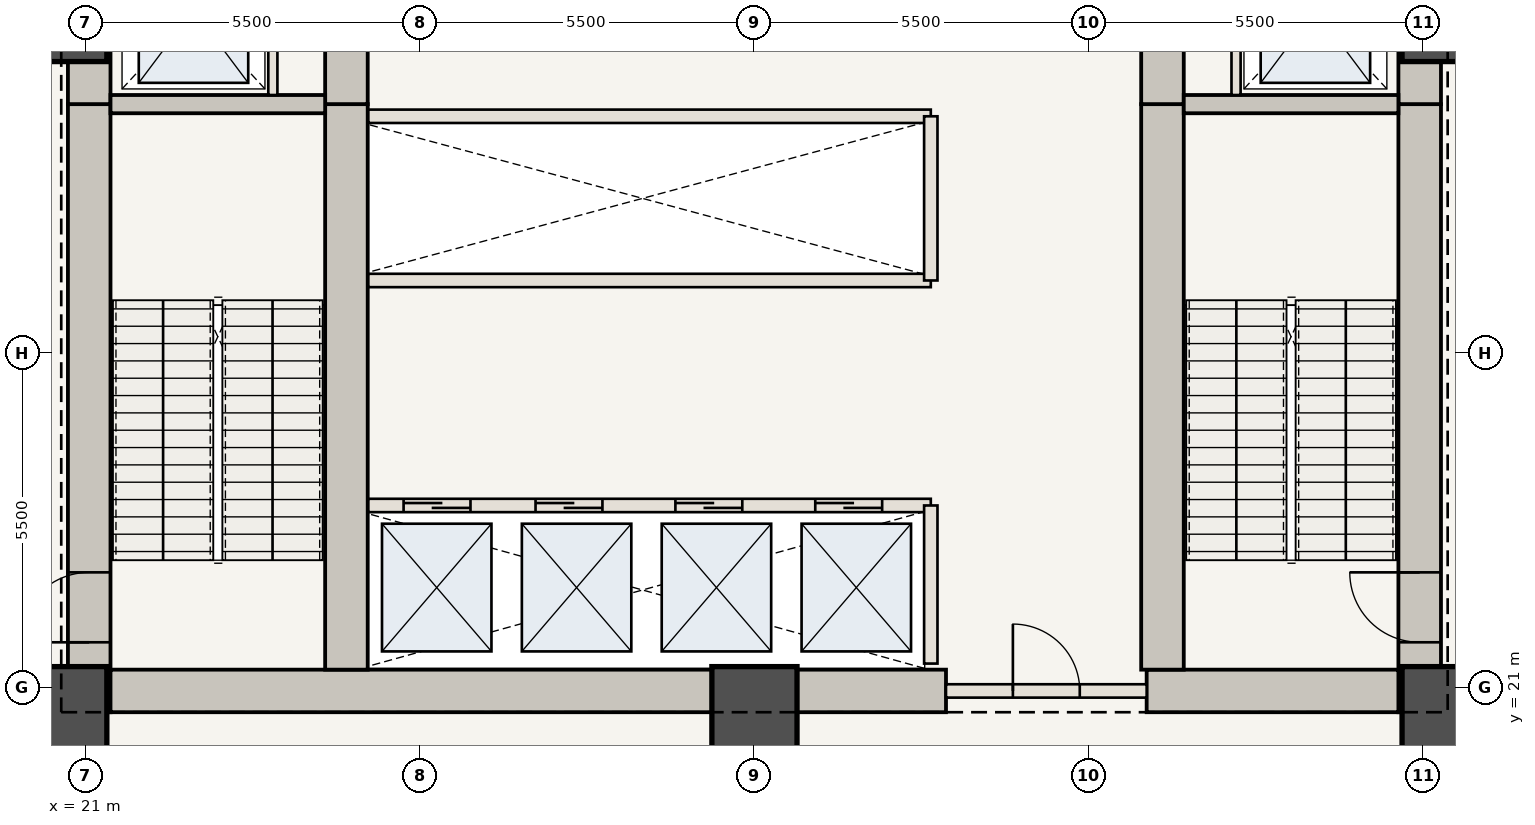
"""IFC4 building model, lengths in metres.
Left out: names, types, materials, properties, quantities, classifications, styles, units other than length and angle.
Written with IfcOpenShell. Run it as: python <this file> out.ifc"""

import sys

from ifc_helpers import new_model, si_unit, direction, frame, frame_2d, origin, origin_2d, place, context, subcontext, project, spatial, rectangle, extrude, element, fill, save


model = new_model("IFC4")
c1 = context("Model", 3, precision=1e-05, world=origin(), true_north=direction((0.0, 1.0)))
c2 = subcontext(c1, "Body", "Model", "MODEL_VIEW")
j1 = project(units=[si_unit("LENGTHUNIT", "METRE"), si_unit("PLANEANGLEUNIT", "RADIAN")], contexts=[c1])
p1 = place(None, origin())
s1 = spatial("IfcSite", under=j1, at=p1, CompositionType="ELEMENT")
p2 = place(p1, origin())
s2 = spatial("IfcBuilding", under=s1, at=p2, CompositionType="ELEMENT")
p3 = place(p2, frame((0.0, 0.0, 23.8)))
s3 = spatial("IfcBuildingStorey", under=s2, at=p3, CompositionType="ELEMENT", Elevation=23.8)
p4 = place(p3, frame((21.06, 20.6, 0.0), z_axis=(0.0, 0.0, 1.0), x_axis=(0.0, 1.0, 0.0)))
e1 = element("IfcWall", 1, at=p4, inside=s3, PredefinedType="SHEAR", context=c2, shape_type="SweptSolid", body=[
    extrude(rectangle(XDim=10.0, YDim=0.7, at=frame_2d((5.0, 0.0))), origin(), (0.0, 0.0, 1.0), 5.6),
])
p5 = place(p4, frame((1.15, 0.0, 0.0)))
e2 = element("IfcOpeningElement", 2, at=p5, cuts=e1, PredefinedType="OPENING", context=c2, shape_type="SweptSolid", body=[
    extrude(rectangle(XDim=1.15, YDim=2.15, at=frame_2d((0.575, 1.075))), frame((0.0, 0.36, 0.0), z_axis=(0.0, -1.0, 0.0), x_axis=(1.0, 0.0, 0.0)), (0.0, 0.0, 1.0), 0.72),
])
p6 = place(p3, frame((21.06, 30.6, 0.0), z_axis=(0.0, 0.0, 1.0), x_axis=(0.0, 1.0, 0.0)))
e3 = element("IfcWall", 3, at=p6, inside=s3, PredefinedType="SHEAR", context=c2, shape_type="SweptSolid", body=[
    extrude(rectangle(XDim=12.75, YDim=0.7, at=frame_2d((6.375, 0.0))), origin(), (0.0, 0.0, 1.0), 5.6),
])
p7 = place(p6, frame((4.2, 0.0, 0.0)))
e4 = element("IfcOpeningElement", 4, at=p7, cuts=e3, PredefinedType="OPENING", context=c2, shape_type="SweptSolid", body=[
    extrude(rectangle(XDim=1.1, YDim=2.15, at=frame_2d((0.55, 1.075))), frame((0.0, 0.36, 0.0), z_axis=(0.0, -1.0, 0.0), x_axis=(1.0, 0.0, 0.0)), (0.0, 0.0, 1.0), 0.72),
])
p8 = place(p6, frame((9.2, 0.0, 0.0)))
e5 = element("IfcOpeningElement", 5, at=p8, cuts=e3, PredefinedType="OPENING", context=c2, shape_type="SweptSolid", body=[
    extrude(rectangle(XDim=0.92, YDim=2.1, at=frame_2d((0.46, 1.05))), frame((0.0, 0.36, 0.0), z_axis=(0.0, -1.0, 0.0), x_axis=(1.0, 0.0, 0.0)), (0.0, 0.0, 1.0), 0.72),
])
p9 = place(p3, frame((42.94, 20.6, 0.0), z_axis=(0.0, 0.0, 1.0), x_axis=(0.0, 1.0, 0.0)))
e6 = element("IfcWall", 6, at=p9, inside=s3, PredefinedType="SHEAR", context=c2, shape_type="SweptSolid", body=[
    extrude(rectangle(XDim=10.0, YDim=0.7, at=frame_2d((5.0, 0.0))), origin(), (0.0, 0.0, 1.0), 5.6),
])
p10 = place(p9, frame((1.15, 0.0, 0.0)))
e7 = element("IfcOpeningElement", 7, at=p10, cuts=e6, PredefinedType="OPENING", context=c2, shape_type="SweptSolid", body=[
    extrude(rectangle(XDim=1.15, YDim=2.15, at=frame_2d((0.575, 1.075))), frame((0.0, 0.36, 0.0), z_axis=(0.0, -1.0, 0.0), x_axis=(1.0, 0.0, 0.0)), (0.0, 0.0, 1.0), 0.72),
])
p11 = place(p3, frame((42.94, 30.6, 0.0), z_axis=(0.0, 0.0, 1.0), x_axis=(0.0, 1.0, 0.0)))
e8 = element("IfcWall", 8, at=p11, inside=s3, PredefinedType="SHEAR", context=c2, shape_type="SweptSolid", body=[
    extrude(rectangle(XDim=12.75, YDim=0.7, at=frame_2d((6.375, 0.0))), origin(), (0.0, 0.0, 1.0), 5.6),
])
p12 = place(p11, frame((4.2, 0.0, 0.0)))
e9 = element("IfcOpeningElement", 9, at=p12, cuts=e8, PredefinedType="OPENING", context=c2, shape_type="SweptSolid", body=[
    extrude(rectangle(XDim=1.1, YDim=2.15, at=frame_2d((0.55, 1.075))), frame((0.0, 0.36, 0.0), z_axis=(0.0, -1.0, 0.0), x_axis=(1.0, 0.0, 0.0)), (0.0, 0.0, 1.0), 0.72),
])
p13 = place(p11, frame((8.05, 0.0, 0.0)))
e10 = element("IfcOpeningElement", 10, at=p13, cuts=e8, PredefinedType="OPENING", context=c2, shape_type="SweptSolid", body=[
    extrude(rectangle(XDim=0.88, YDim=2.1, at=frame_2d((0.44, 1.05))), frame((0.0, 0.36, 0.0), z_axis=(0.0, -1.0, 0.0), x_axis=(1.0, 0.0, 0.0)), (0.0, 0.0, 1.0), 0.72),
])
p14 = place(p11, frame((9.45, 0.0, 0.0)))
e11 = element("IfcOpeningElement", 11, at=p14, cuts=e8, PredefinedType="OPENING", context=c2, shape_type="SweptSolid", body=[
    extrude(rectangle(XDim=0.88, YDim=2.1, at=frame_2d((0.44, 1.05))), frame((0.0, 0.36, 0.0), z_axis=(0.0, -1.0, 0.0), x_axis=(1.0, 0.0, 0.0)), (0.0, 0.0, 1.0), 0.72),
])
p15 = place(p11, frame((10.85, 0.0, 0.0)))
e12 = element("IfcOpeningElement", 12, at=p15, cuts=e8, PredefinedType="OPENING", context=c2, shape_type="SweptSolid", body=[
    extrude(rectangle(XDim=0.88, YDim=2.1, at=frame_2d((0.44, 1.05))), frame((0.0, 0.36, 0.0), z_axis=(0.0, -1.0, 0.0), x_axis=(1.0, 0.0, 0.0)), (0.0, 0.0, 1.0), 0.72),
])
p16 = place(p3, frame((21.41, 20.95, 0.0), z_axis=(0.0, 0.0, 1.0), x_axis=(1.0, 0.0, 0.0)))
e13 = element("IfcWall", 13, at=p16, inside=s3, PredefinedType="SHEAR", context=c2, shape_type="SweptSolid", body=[
    extrude(rectangle(XDim=13.74, YDim=0.7, at=frame_2d((6.87, 0.0))), origin(), (0.0, 0.0, 1.0), 5.6),
])
p17 = place(p3, frame((38.45, 20.95, 0.0), z_axis=(0.0, 0.0, 1.0), x_axis=(1.0, 0.0, 0.0)))
e14 = element("IfcWall", 14, at=p17, inside=s3, PredefinedType="SHEAR", context=c2, shape_type="SweptSolid", body=[
    extrude(rectangle(XDim=4.14, YDim=0.7, at=frame_2d((2.07, 0.0))), origin(), (0.0, 0.0, 1.0), 5.6),
])
p18 = place(p3, frame((25.29, 21.3, 0.0), z_axis=(0.0, 0.0, 1.0), x_axis=(0.0, 1.0, 0.0)))
e15 = element("IfcWall", 15, at=p18, inside=s3, PredefinedType="SHEAR", context=c2, shape_type="SweptSolid", body=[
    extrude(rectangle(XDim=9.3, YDim=0.7, at=frame_2d((4.65, 0.0))), origin(), (0.0, 0.0, 1.0), 5.6),
])
p19 = place(p3, frame((25.29, 30.6, 0.0), z_axis=(0.0, 0.0, 1.0), x_axis=(0.0, 1.0, 0.0)))
e16 = element("IfcWall", 16, at=p19, inside=s3, PredefinedType="SHEAR", context=c2, shape_type="SweptSolid", body=[
    extrude(rectangle(XDim=12.05, YDim=0.7, at=frame_2d((6.025, 0.0))), origin(), (0.0, 0.0, 1.0), 5.6),
])
p20 = place(p19, frame((6.25, 0.0, 0.0)))
e17 = element("IfcOpeningElement", 17, at=p20, cuts=e16, PredefinedType="OPENING", context=c2, shape_type="SweptSolid", body=[
    extrude(rectangle(XDim=1.1, YDim=2.15, at=frame_2d((0.55, 1.075))), frame((0.0, 0.36, 0.0), z_axis=(0.0, -1.0, 0.0), x_axis=(1.0, 0.0, 0.0)), (0.0, 0.0, 1.0), 0.72),
])
p21 = place(p3, frame((38.71, 21.3, 0.0), z_axis=(0.0, 0.0, 1.0), x_axis=(0.0, 1.0, 0.0)))
e18 = element("IfcWall", 18, at=p21, inside=s3, PredefinedType="SHEAR", context=c2, shape_type="SweptSolid", body=[
    extrude(rectangle(XDim=9.3, YDim=0.7, at=frame_2d((4.65, 0.0))), origin(), (0.0, 0.0, 1.0), 5.6),
])
p22 = place(p3, frame((38.71, 30.6, 0.0), z_axis=(0.0, 0.0, 1.0), x_axis=(0.0, 1.0, 0.0)))
e19 = element("IfcWall", 19, at=p22, inside=s3, PredefinedType="SHEAR", context=c2, shape_type="SweptSolid", body=[
    extrude(rectangle(XDim=12.05, YDim=0.7, at=frame_2d((6.025, 0.0))), origin(), (0.0, 0.0, 1.0), 5.6),
])
for number, where, z_axis, x_axis in (
    (20, (20.65, 20.65, 0.0), (0.0, 0.0, 1.0), (1.0, 0.0, 0.0)),
    (21, (32.0, 20.65, 0.0), (0.0, 0.0, 1.0), (1.0, 0.0, 0.0)),
    (22, (43.35, 20.65, 0.0), (0.0, 0.0, 1.0), (1.0, 0.0, 0.0)),
    (23, (43.35, 32.0, 0.0), (0.0, 0.0, 1.0), (1.0, 0.0, 0.0)),
    (24, (20.65, 32.0, 0.0), (0.0, 0.0, 1.0), (1.0, 0.0, 0.0)),
):
    element("IfcColumn", number, at=place(p3, frame(where, z_axis=z_axis, x_axis=x_axis)), inside=s3, PredefinedType="COLUMN", context=c2, shape_type="SweptSolid", body=[
        extrude(rectangle(XDim=1.4, YDim=1.4, at=origin_2d()), origin(), (0.0, 0.0, 1.0), 5.6),
    ])
for number, where, z_axis, x_axis in (
    (25, (21.41, 30.6, 0.0), (0.0, 0.0, 1.0), (1.0, 0.0, 0.0)),
    (26, (39.06, 30.6, 0.0), (0.0, 0.0, 1.0), (1.0, 0.0, 0.0)),
):
    element("IfcWall", number, at=place(p3, frame(where, z_axis=z_axis, x_axis=x_axis)), inside=s3, PredefinedType="SHEAR", context=c2, shape_type="SweptSolid", body=[
        extrude(rectangle(XDim=3.53, YDim=0.3, at=frame_2d((1.765, 0.0))), origin(), (0.0, 0.0, 1.0), 5.18),
    ])
for number, where, z_axis, x_axis in (
    (27, (24.08, 30.75, 0.0), (0.0, 0.0, 1.0), (0.0, 1.0, 0.0)),
    (28, (39.92, 30.75, 0.0), (0.0, 0.0, 1.0), (0.0, 1.0, 0.0)),
):
    element("IfcWall", number, at=place(p3, frame(where, z_axis=z_axis, x_axis=x_axis)), inside=s3, PredefinedType="STANDARD", context=c2, shape_type="SweptSolid", body=[
        extrude(rectangle(XDim=2.65, YDim=0.15, at=frame_2d((1.325, 0.0))), origin(), (0.0, 0.0, 1.0), 5.18),
    ])
p23 = place(p3, frame((35.15, 20.95, 0.0), z_axis=(0.0, 0.0, 1.0), x_axis=(1.0, 0.0, 0.0)))
e29 = element("IfcWall", 29, at=p23, inside=s3, PredefinedType="STANDARD", context=c2, shape_type="SweptSolid", body=[
    extrude(rectangle(XDim=3.3, YDim=0.22, at=frame_2d((1.65, 0.0))), origin(), (0.0, 0.0, 1.0), 5.18),
])
p24 = place(p23, frame((1.1, 0.0, 0.0)))
e30 = element("IfcOpeningElement", 30, at=p24, cuts=e29, PredefinedType="OPENING", context=c2, shape_type="SweptSolid", body=[
    extrude(rectangle(XDim=1.1, YDim=2.15, at=frame_2d((0.55, 1.075))), frame((0.0, 0.12, 0.0), z_axis=(0.0, -1.0, 0.0), x_axis=(1.0, 0.0, 0.0)), (0.0, 0.0, 1.0), 0.24),
])
p25 = place(p3, frame((25.65, 24.0, 0.0), z_axis=(0.0, 0.0, 1.0), x_axis=(1.0, 0.0, 0.0)))
e31 = element("IfcWall", 31, at=p25, inside=s3, PredefinedType="STANDARD", context=c2, shape_type="SweptSolid", body=[
    extrude(rectangle(XDim=9.25, YDim=0.22, at=frame_2d((4.625, 0.0))), origin(), (0.0, 0.0, 1.0), 5.18),
])
p26 = place(p25, frame((0.58, 0.0, 0.0)))
e32 = element("IfcOpeningElement", 32, at=p26, cuts=e31, PredefinedType="OPENING", context=c2, shape_type="SweptSolid", body=[
    extrude(rectangle(XDim=1.1, YDim=2.15, at=frame_2d((0.55, 1.075))), frame((0.0, 0.12, 0.0), z_axis=(0.0, -1.0, 0.0), x_axis=(1.0, 0.0, 0.0)), (0.0, 0.0, 1.0), 0.24),
])
p27 = place(p25, frame((2.75, 0.0, 0.0)))
e33 = element("IfcOpeningElement", 33, at=p27, cuts=e31, PredefinedType="OPENING", context=c2, shape_type="SweptSolid", body=[
    extrude(rectangle(XDim=1.1, YDim=2.15, at=frame_2d((0.55, 1.075))), frame((0.0, 0.12, 0.0), z_axis=(0.0, -1.0, 0.0), x_axis=(1.0, 0.0, 0.0)), (0.0, 0.0, 1.0), 0.24),
])
p28 = place(p25, frame((5.05, 0.0, 0.0)))
e34 = element("IfcOpeningElement", 34, at=p28, cuts=e31, PredefinedType="OPENING", context=c2, shape_type="SweptSolid", body=[
    extrude(rectangle(XDim=1.1, YDim=2.15, at=frame_2d((0.55, 1.075))), frame((0.0, 0.12, 0.0), z_axis=(0.0, -1.0, 0.0), x_axis=(1.0, 0.0, 0.0)), (0.0, 0.0, 1.0), 0.24),
])
p29 = place(p25, frame((7.35, 0.0, 0.0)))
e35 = element("IfcOpeningElement", 35, at=p29, cuts=e31, PredefinedType="OPENING", context=c2, shape_type="SweptSolid", body=[
    extrude(rectangle(XDim=1.1, YDim=2.15, at=frame_2d((0.55, 1.075))), frame((0.0, 0.12, 0.0), z_axis=(0.0, -1.0, 0.0), x_axis=(1.0, 0.0, 0.0)), (0.0, 0.0, 1.0), 0.24),
])
p30 = place(p3, frame((34.9, 21.4, 0.0), z_axis=(0.0, 0.0, 1.0), x_axis=(0.0, 1.0, 0.0)))
e36 = element("IfcWall", 36, at=p30, inside=s3, PredefinedType="STANDARD", context=c2, shape_type="SweptSolid", body=[
    extrude(rectangle(XDim=2.6, YDim=0.22, at=frame_2d((1.3, 0.0))), origin(), (0.0, 0.0, 1.0), 5.18),
])
for number, where, z_axis, x_axis in (
    (37, (25.65, 27.7, 0.0), (0.0, 0.0, 1.0), (1.0, 0.0, 0.0)),
    (38, (25.65, 30.4, 0.0), (0.0, 0.0, 1.0), (1.0, 0.0, 0.0)),
):
    element("IfcWall", number, at=place(p3, frame(where, z_axis=z_axis, x_axis=x_axis)), inside=s3, PredefinedType="STANDARD", context=c2, shape_type="SweptSolid", body=[
        extrude(rectangle(XDim=9.25, YDim=0.22, at=frame_2d((4.625, 0.0))), origin(), (0.0, 0.0, 1.0), 5.18),
    ])
p31 = place(p3, frame((34.9, 27.7, 0.0), z_axis=(0.0, 0.0, 1.0), x_axis=(0.0, 1.0, 0.0)))
e39 = element("IfcWall", 39, at=p31, inside=s3, PredefinedType="STANDARD", context=c2, shape_type="SweptSolid", body=[
    extrude(rectangle(XDim=2.7, YDim=0.22, at=frame_2d((1.35, 0.0))), origin(), (0.0, 0.0, 1.0), 5.18),
])
p32 = place(p5, origin())
e40 = element("IfcDoor", 40, at=p32, inside=s3, OperationType="SINGLE_SWING_LEFT", PredefinedType="DOOR", context=c2, shape_type="SweptSolid", body=[
    extrude(rectangle(XDim=1.15, YDim=2.15, at=frame_2d((0.575, 1.075))), frame((0.0, 0.025, 0.0), z_axis=(0.0, -1.0, 0.0), x_axis=(1.0, 0.0, 0.0)), (0.0, 0.0, 1.0), 0.05),
])
fill(e2, e40)
p33 = place(p10, origin())
e41 = element("IfcDoor", 41, at=p33, inside=s3, OperationType="SINGLE_SWING_RIGHT", PredefinedType="DOOR", context=c2, shape_type="SweptSolid", body=[
    extrude(rectangle(XDim=1.15, YDim=2.15, at=frame_2d((0.575, 1.075))), frame((0.0, 0.025, 0.0), z_axis=(0.0, -1.0, 0.0), x_axis=(1.0, 0.0, 0.0)), (0.0, 0.0, 1.0), 0.05),
])
fill(e7, e41)
p34 = place(p24, origin())
e42 = element("IfcDoor", 42, at=p34, inside=s3, OperationType="SINGLE_SWING_LEFT", PredefinedType="DOOR", context=c2, shape_type="SweptSolid", body=[
    extrude(rectangle(XDim=1.1, YDim=2.15, at=frame_2d((0.55, 1.075))), frame((0.0, 0.025, 0.0), z_axis=(0.0, -1.0, 0.0), x_axis=(1.0, 0.0, 0.0)), (0.0, 0.0, 1.0), 0.05),
])
fill(e30, e42)
p35 = place(p26, origin())
e43 = element("IfcDoor", 43, at=p35, inside=s3, OperationType="DOUBLE_DOOR_SLIDING", PredefinedType="DOOR", context=c2, shape_type="SweptSolid", body=[
    extrude(rectangle(XDim=1.1, YDim=2.15, at=frame_2d((0.55, 1.075))), frame((0.0, 0.025, 0.0), z_axis=(0.0, -1.0, 0.0), x_axis=(1.0, 0.0, 0.0)), (0.0, 0.0, 1.0), 0.05),
])
fill(e32, e43)
p36 = place(p27, origin())
e44 = element("IfcDoor", 44, at=p36, inside=s3, OperationType="DOUBLE_DOOR_SLIDING", PredefinedType="DOOR", context=c2, shape_type="SweptSolid", body=[
    extrude(rectangle(XDim=1.1, YDim=2.15, at=frame_2d((0.55, 1.075))), frame((0.0, 0.025, 0.0), z_axis=(0.0, -1.0, 0.0), x_axis=(1.0, 0.0, 0.0)), (0.0, 0.0, 1.0), 0.05),
])
fill(e33, e44)
p37 = place(p28, origin())
e45 = element("IfcDoor", 45, at=p37, inside=s3, OperationType="DOUBLE_DOOR_SLIDING", PredefinedType="DOOR", context=c2, shape_type="SweptSolid", body=[
    extrude(rectangle(XDim=1.1, YDim=2.15, at=frame_2d((0.55, 1.075))), frame((0.0, 0.025, 0.0), z_axis=(0.0, -1.0, 0.0), x_axis=(1.0, 0.0, 0.0)), (0.0, 0.0, 1.0), 0.05),
])
fill(e34, e45)
p38 = place(p29, origin())
e46 = element("IfcDoor", 46, at=p38, inside=s3, OperationType="DOUBLE_DOOR_SLIDING", PredefinedType="DOOR", context=c2, shape_type="SweptSolid", body=[
    extrude(rectangle(XDim=1.1, YDim=2.15, at=frame_2d((0.55, 1.075))), frame((0.0, 0.025, 0.0), z_axis=(0.0, -1.0, 0.0), x_axis=(1.0, 0.0, 0.0)), (0.0, 0.0, 1.0), 0.05),
])
fill(e35, e46)
save(model, sys.argv[1])
